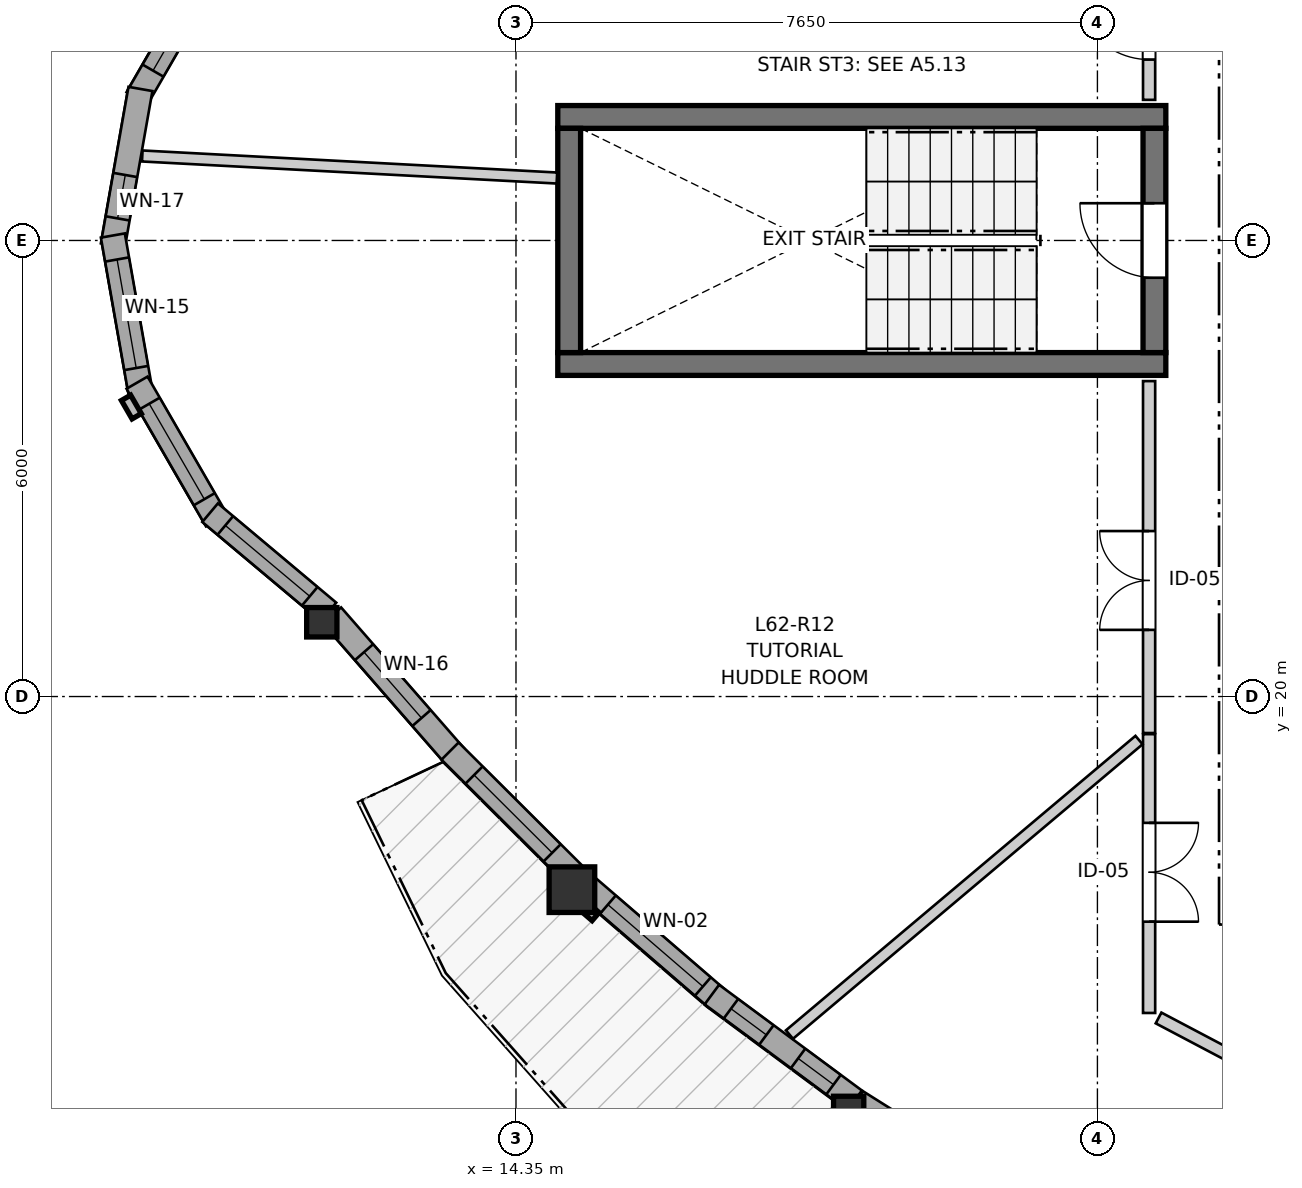
"""IFC4 building model, lengths in metres.
Left out: names, types, materials, properties, quantities, classifications, styles, units other than length and angle.
Written with IfcOpenShell. Run it as: python <this file> out.ifc"""

import sys

from ifc_helpers import new_model, si_unit, direction, frame, frame_2d, origin, origin_2d, place, context, subcontext, project, spatial, rectangle, i_section, extrude, source, transform, mapped, element, fill, save


model = new_model("IFC4")
c1 = context("Model", 3, precision=1e-05, world=origin(), true_north=direction((0.0, 1.0)))
c2 = subcontext(c1, "Body", "Model", "MODEL_VIEW")
j1 = project(units=[si_unit("LENGTHUNIT", "METRE"), si_unit("PLANEANGLEUNIT", "RADIAN")], contexts=[c1])
p1 = place(None, origin())
s1 = spatial("IfcSite", under=j1, at=p1, CompositionType="ELEMENT")
p2 = place(p1, origin())
s2 = spatial("IfcBuilding", under=s1, at=p2, CompositionType="ELEMENT")
p3 = place(p2, frame((0.0, 0.0, 208.4)))
s3 = spatial("IfcBuildingStorey", under=s2, at=p3, CompositionType="ELEMENT", Elevation=208.4)
for number, where, z_axis, x_axis in (
    (1, (14.9, 24.375, 0.0), (0.0, 0.0, 1.0), (1.0, 0.0, 0.0)),
    (2, (22.9, 27.625, 0.0), (0.0, 0.0, 1.0), (-1.0, 0.0, 0.0)),
):
    element("IfcWall", number, at=place(p3, frame(where, z_axis=z_axis, x_axis=x_axis)), inside=s3, PredefinedType="SHEAR", context=c2, shape_type="SweptSolid", body=[
        extrude(rectangle(XDim=8.0, YDim=0.3, at=frame_2d((4.0, 0.0))), origin(), (0.0, 0.0, 1.0), 2.935),
    ])
p4 = place(p3, frame((15.05, 27.475, 0.0), z_axis=(0.0, 0.0, 1.0), x_axis=(0.0, -1.0, 0.0)))
e3 = element("IfcWall", 3, at=p4, inside=s3, PredefinedType="SHEAR", context=c2, shape_type="SweptSolid", body=[
    extrude(rectangle(XDim=2.95, YDim=0.3, at=frame_2d((1.475, 0.0))), origin(), (0.0, 0.0, 1.0), 2.935),
])
p5 = place(p3, frame((22.75, 24.525, 0.0), z_axis=(0.0, 0.0, 1.0), x_axis=(0.0, 1.0, 0.0)))
e4 = element("IfcWall", 4, at=p5, inside=s3, PredefinedType="SHEAR", context=c2, shape_type="SweptSolid", body=[
    extrude(rectangle(XDim=2.95, YDim=0.3, at=frame_2d((1.475, 0.0))), origin(), (0.0, 0.0, 1.0), 2.935),
])
p6 = place(p5, frame((0.985, 0.0, 0.0)))
e5 = element("IfcOpeningElement", 5, at=p6, cuts=e4, PredefinedType="OPENING", context=c2, shape_type="SweptSolid", body=[
    extrude(rectangle(XDim=0.98, YDim=2.15, at=frame_2d((0.49, 1.075))), frame((0.0, 0.16, 0.0), z_axis=(0.0, -1.0, 0.0), x_axis=(1.0, 0.0, 0.0)), (0.0, 0.0, 1.0), 0.32),
])
m1 = source(origin(), c2, "Body", "SweptSolid", [
    extrude(i_section(OverallWidth=0.398, OverallDepth=0.387, WebThickness=0.019, FlangeThickness=0.03, FilletRadius=0.015, at=origin_2d()), origin(), (0.0, 0.0, 1.0), 2.935),
])
p7 = place(p3, frame((11.795, 20.977, 0.0), z_axis=(0.0, 0.0, 1.0), x_axis=(1.0, 0.0, 0.0)))
e6 = element("IfcColumn", 6, at=p7, inside=s3, PredefinedType="PILASTER", context=c2, shape_type="MappedRepresentation", body=[
    mapped(m1, transform((0.0, 0.0, 0.0), x_axis=(1.0, 0.0, 0.0), y_axis=(0.0, 1.0, 0.0), z_axis=(0.0, 0.0, 1.0), scale=1.0)),
])
m2 = source(origin(), c2, "Body", "SweptSolid", [
    extrude(rectangle(XDim=0.6, YDim=0.6, at=origin_2d()), origin(), (0.0, 0.0, 1.0), 2.935),
])
p8 = place(p3, frame((15.086, 17.459, 0.0), z_axis=(0.0, 0.0, 1.0), x_axis=(1.0, 0.0, 0.0)))
e7 = element("IfcColumn", 7, at=p8, inside=s3, PredefinedType="COLUMN", context=c2, shape_type="MappedRepresentation", body=[
    mapped(m2, transform((0.0, 0.0, 0.0), x_axis=(1.0, 0.0, 0.0), y_axis=(0.0, 1.0, 0.0), z_axis=(0.0, 0.0, 1.0), scale=1.0)),
])
p9 = place(p3, frame((18.727, 14.548, 0.0), z_axis=(0.0, 0.0, 1.0), x_axis=(1.0, 0.0, 0.0)))
e8 = element("IfcColumn", 8, at=p9, inside=s3, PredefinedType="PILASTER", context=c2, shape_type="MappedRepresentation", body=[
    mapped(m1, transform((0.0, 0.0, 0.0), x_axis=(1.0, 0.0, 0.0), y_axis=(0.0, 1.0, 0.0), z_axis=(0.0, 0.0, 1.0), scale=1.0)),
])
p10 = place(p3, frame((10.409, 29.681, 0.0), z_axis=(0.0, 0.0, 1.0), x_axis=(-0.49990781971, -0.866078617559, 0.0)))
e9 = element("IfcWall", 9, at=p10, inside=s3, PredefinedType="SOLIDWALL", context=c2, shape_type="SweptSolid", body=[
    extrude(rectangle(XDim=2.09, YDim=0.32, at=frame_2d((1.045, 0.0))), origin(), (0.0, 0.0, 1.0), 2.555),
])
p11 = place(p10, frame((0.42, 0.0, 0.82)))
e10 = element("IfcOpeningElement", 10, at=p11, cuts=e9, PredefinedType="OPENING", context=c2, shape_type="SweptSolid", body=[
    extrude(rectangle(XDim=1.25, YDim=1.35, at=frame_2d((0.625, 0.675))), frame((0.0, 0.17, 0.0), z_axis=(0.0, -1.0, 0.0), x_axis=(1.0, 0.0, 0.0)), (0.0, 0.0, 1.0), 0.34),
])
p12 = place(p3, frame((9.409, 27.993, 0.0), z_axis=(0.0, 0.0, 1.0), x_axis=(-0.173672066494, -0.984803540469, 0.0)))
e11 = element("IfcWall", 11, at=p12, inside=s3, PredefinedType="SOLIDWALL", context=c2, shape_type="SweptSolid", body=[
    extrude(rectangle(XDim=2.09, YDim=0.32, at=frame_2d((1.045, 0.0))), origin(), (0.0, 0.0, 1.0), 2.555),
])
p13 = place(p12, frame((1.149, 0.0, 0.82)))
e12 = element("IfcOpeningElement", 12, at=p13, cuts=e11, PredefinedType="OPENING", context=c2, shape_type="SweptSolid", body=[
    extrude(rectangle(XDim=0.58, YDim=1.35, at=frame_2d((0.29, 0.675))), frame((0.0, 0.17, 0.0), z_axis=(0.0, -1.0, 0.0), x_axis=(1.0, 0.0, 0.0)), (0.0, 0.0, 1.0), 0.34),
])
p14 = place(p3, frame((9.046, 26.065, 0.0), z_axis=(0.0, 0.0, 1.0), x_axis=(0.173672066494, -0.984803540469, 0.0)))
e13 = element("IfcWall", 13, at=p14, inside=s3, PredefinedType="SOLIDWALL", context=c2, shape_type="SweptSolid", body=[
    extrude(rectangle(XDim=2.09, YDim=0.32, at=frame_2d((1.045, 0.0))), origin(), (0.0, 0.0, 1.0), 2.555),
])
p15 = place(p14, frame((0.32, 0.0, 0.82)))
e14 = element("IfcOpeningElement", 14, at=p15, cuts=e13, PredefinedType="OPENING", context=c2, shape_type="SweptSolid", body=[
    extrude(rectangle(XDim=1.45, YDim=1.25, at=frame_2d((0.725, 0.625))), frame((0.0, 0.17, 0.0), z_axis=(0.0, -1.0, 0.0), x_axis=(1.0, 0.0, 0.0)), (0.0, 0.0, 1.0), 0.34),
])
p16 = place(p3, frame((9.365, 24.129, 0.0), z_axis=(0.0, 0.0, 1.0), x_axis=(0.49990781971, -0.866078617559, 0.0)))
e15 = element("IfcWall", 15, at=p16, inside=s3, PredefinedType="SOLIDWALL", context=c2, shape_type="SweptSolid", body=[
    extrude(rectangle(XDim=2.09, YDim=0.32, at=frame_2d((1.045, 0.0))), origin(), (0.0, 0.0, 1.0), 2.555),
])
p17 = place(p16, frame((0.32, 0.0, 0.82)))
e16 = element("IfcOpeningElement", 16, at=p17, cuts=e15, PredefinedType="OPENING", context=c2, shape_type="SweptSolid", body=[
    extrude(rectangle(XDim=1.45, YDim=1.25, at=frame_2d((0.725, 0.625))), frame((0.0, 0.17, 0.0), z_axis=(0.0, -1.0, 0.0), x_axis=(1.0, 0.0, 0.0)), (0.0, 0.0, 1.0), 0.34),
])
p18 = place(p3, frame((10.326, 22.419, 0.0), z_axis=(0.0, 0.0, 1.0), x_axis=(0.766099948115, -0.642721455608, 0.0)))
e17 = element("IfcWall", 17, at=p18, inside=s3, PredefinedType="SOLIDWALL", context=c2, shape_type="SweptSolid", body=[
    extrude(rectangle(XDim=2.032, YDim=0.32, at=frame_2d((1.016, 0.0))), origin(), (0.0, 0.0, 1.0), 2.555),
])
p19 = place(p18, frame((0.261, 0.0, 0.82)))
e18 = element("IfcOpeningElement", 18, at=p19, cuts=e17, PredefinedType="OPENING", context=c2, shape_type="SweptSolid", body=[
    extrude(rectangle(XDim=1.45, YDim=1.25, at=frame_2d((0.725, 0.625))), frame((0.0, 0.17, 0.0), z_axis=(0.0, -1.0, 0.0), x_axis=(1.0, 0.0, 0.0)), (0.0, 0.0, 1.0), 0.34),
])
p20 = place(p3, frame((11.929, 21.067, 0.0), z_axis=(0.0, 0.0, 1.0), x_axis=(0.657623588515, -0.753346677054, 0.0)))
e19 = element("IfcWall", 19, at=p20, inside=s3, PredefinedType="SOLIDWALL", context=c2, shape_type="SweptSolid", body=[
    extrude(rectangle(XDim=2.454, YDim=0.32, at=frame_2d((1.227, 0.0))), origin(), (0.0, 0.0, 1.0), 2.555),
])
p21 = place(p20, frame((0.642, 0.0, 0.82)))
e20 = element("IfcOpeningElement", 20, at=p21, cuts=e19, PredefinedType="OPENING", context=c2, shape_type="SweptSolid", body=[
    extrude(rectangle(XDim=1.15, YDim=1.2, at=frame_2d((0.575, 0.6))), frame((0.0, 0.17, 0.0), z_axis=(0.0, -1.0, 0.0), x_axis=(1.0, 0.0, 0.0)), (0.0, 0.0, 1.0), 0.34),
])
p22 = place(p3, frame((13.483, 19.282, 0.0), z_axis=(0.0, 0.0, 1.0), x_axis=(0.7083616261, -0.70584970544, 0.0)))
e21 = element("IfcWall", 21, at=p22, inside=s3, PredefinedType="SOLIDWALL", context=c2, shape_type="SweptSolid", body=[
    extrude(rectangle(XDim=2.333, YDim=0.32, at=frame_2d((1.166, 0.0))), origin(), (0.0, 0.0, 1.0), 2.555),
])
p23 = place(p22, frame((0.446, 0.0, 0.82)))
e22 = element("IfcOpeningElement", 22, at=p23, cuts=e21, PredefinedType="OPENING", context=c2, shape_type="SweptSolid", body=[
    extrude(rectangle(XDim=1.45, YDim=1.25, at=frame_2d((0.725, 0.625))), frame((0.0, 0.17, 0.0), z_axis=(0.0, -1.0, 0.0), x_axis=(1.0, 0.0, 0.0)), (0.0, 0.0, 1.0), 0.34),
])
p24 = place(p3, frame((15.259, 17.521, 0.0), z_axis=(0.0, 0.0, 1.0), x_axis=(0.757533377792, -0.652796431923, 0.0)))
e23 = element("IfcWall", 23, at=p24, inside=s3, PredefinedType="SOLIDWALL", context=c2, shape_type="SweptSolid", body=[
    extrude(rectangle(XDim=2.294, YDim=0.32, at=frame_2d((1.147, 0.0))), origin(), (0.0, 0.0, 1.0), 2.555),
])
p25 = place(p24, frame((0.397, 0.0, 0.82)))
e24 = element("IfcOpeningElement", 24, at=p25, cuts=e23, PredefinedType="OPENING", context=c2, shape_type="SweptSolid", body=[
    extrude(rectangle(XDim=1.65, YDim=1.45, at=frame_2d((0.825, 0.725))), frame((0.0, 0.17, 0.0), z_axis=(0.0, -1.0, 0.0), x_axis=(1.0, 0.0, 0.0)), (0.0, 0.0, 1.0), 0.34),
])
p26 = place(p3, frame((16.927, 16.079, 0.0), z_axis=(0.0, 0.0, 1.0), x_axis=(0.803843896942, -0.594840305754, 0.0)))
e25 = element("IfcWall", 25, at=p26, inside=s3, PredefinedType="SOLIDWALL", context=c2, shape_type="SweptSolid", body=[
    extrude(rectangle(XDim=2.337, YDim=0.32, at=frame_2d((1.169, 0.0))), origin(), (0.0, 0.0, 1.0), 2.555),
])
p27 = place(p26, frame((0.312, 0.0, 0.82)))
e26 = element("IfcOpeningElement", 26, at=p27, cuts=e25, PredefinedType="OPENING", context=c2, shape_type="SweptSolid", body=[
    extrude(rectangle(XDim=0.58, YDim=1.35, at=frame_2d((0.29, 0.675))), frame((0.0, 0.17, 0.0), z_axis=(0.0, -1.0, 0.0), x_axis=(1.0, 0.0, 0.0)), (0.0, 0.0, 1.0), 0.34),
])
p28 = place(p26, frame((1.411, 0.0, 0.82)))
e27 = element("IfcOpeningElement", 27, at=p28, cuts=e25, PredefinedType="OPENING", context=c2, shape_type="SweptSolid", body=[
    extrude(rectangle(XDim=0.58, YDim=1.35, at=frame_2d((0.29, 0.675))), frame((0.0, 0.17, 0.0), z_axis=(0.0, -1.0, 0.0), x_axis=(1.0, 0.0, 0.0)), (0.0, 0.0, 1.0), 0.34),
])
p29 = place(p3, frame((18.829, 14.673, 0.0), z_axis=(0.0, 0.0, 1.0), x_axis=(0.846418748285, -0.53251788942, 0.0)))
e28 = element("IfcWall", 28, at=p29, inside=s3, PredefinedType="SOLIDWALL", context=c2, shape_type="SweptSolid", body=[
    extrude(rectangle(XDim=2.324, YDim=0.32, at=frame_2d((1.162, 0.0))), origin(), (0.0, 0.0, 1.0), 2.555),
])
p30 = place(p29, frame((0.477, 0.0, 0.82)))
e29 = element("IfcOpeningElement", 29, at=p30, cuts=e28, PredefinedType="OPENING", context=c2, shape_type="SweptSolid", body=[
    extrude(rectangle(XDim=1.35, YDim=1.45, at=frame_2d((0.675, 0.725))), frame((0.0, 0.17, 0.0), z_axis=(0.0, -1.0, 0.0), x_axis=(1.0, 0.0, 0.0)), (0.0, 0.0, 1.0), 0.34),
])
p31 = place(p3, frame((22.68, 19.52, 0.0), z_axis=(0.0, 0.0, 1.0), x_axis=(0.0, 1.0, 0.0)))
e30 = element("IfcWall", 30, at=p31, inside=s3, PredefinedType="PARTITIONING", context=c2, shape_type="SweptSolid", body=[
    extrude(rectangle(XDim=4.63, YDim=0.16, at=frame_2d((2.315, 0.0))), origin(), (0.0, 0.0, 1.0), 2.935),
])
p32 = place(p31, frame((1.357, 0.0, 0.0)))
e31 = element("IfcOpeningElement", 31, at=p32, cuts=e30, PredefinedType="OPENING", context=c2, shape_type="SweptSolid", body=[
    extrude(rectangle(XDim=1.3, YDim=2.1, at=frame_2d((0.65, 1.05))), frame((0.0, 0.09, 0.0), z_axis=(0.0, -1.0, 0.0), x_axis=(1.0, 0.0, 0.0)), (0.0, 0.0, 1.0), 0.18),
])
p33 = place(p3, frame((22.68, 19.505, 0.0), z_axis=(0.0, 0.0, 1.0), x_axis=(0.0, -1.0, 0.0)))
e32 = element("IfcWall", 32, at=p33, inside=s3, PredefinedType="PARTITIONING", context=c2, shape_type="SweptSolid", body=[
    extrude(rectangle(XDim=3.668, YDim=0.16, at=frame_2d((1.834, 0.0))), origin(), (0.0, 0.0, 1.0), 2.935),
])
p34 = place(p33, frame((1.167, 0.0, 0.0)))
e33 = element("IfcOpeningElement", 33, at=p34, cuts=e32, PredefinedType="OPENING", context=c2, shape_type="SweptSolid", body=[
    extrude(rectangle(XDim=1.3, YDim=2.1, at=frame_2d((0.65, 1.05))), frame((0.0, 0.09, 0.0), z_axis=(0.0, -1.0, 0.0), x_axis=(1.0, 0.0, 0.0)), (0.0, 0.0, 1.0), 0.18),
])
p35 = place(p3, frame((22.68, 27.85, 0.0), z_axis=(0.0, 0.0, 1.0), x_axis=(0.0, 1.0, 0.0)))
e34 = element("IfcWall", 34, at=p35, inside=s3, PredefinedType="PARTITIONING", context=c2, shape_type="SweptSolid", body=[
    extrude(rectangle(XDim=1.929, YDim=0.16, at=frame_2d((0.964, 0.0))), origin(), (0.0, 0.0, 1.0), 2.935),
])
p36 = place(p35, frame((0.53, 0.0, 0.0)))
e35 = element("IfcOpeningElement", 35, at=p36, cuts=e34, PredefinedType="OPENING", context=c2, shape_type="SweptSolid", body=[
    extrude(rectangle(XDim=0.96, YDim=2.1, at=frame_2d((0.48, 1.05))), frame((0.0, 0.09, 0.0), z_axis=(0.0, -1.0, 0.0), x_axis=(1.0, 0.0, 0.0)), (0.0, 0.0, 1.0), 0.18),
])
p37 = place(p3, frame((17.948, 15.553, 0.0), z_axis=(0.0, 0.0, 1.0), x_axis=(0.764805901006, 0.644260765364, 0.0)))
e36 = element("IfcWall", 36, at=p37, inside=s3, PredefinedType="PARTITIONING", context=c2, shape_type="SweptSolid", body=[
    extrude(rectangle(XDim=6.013, YDim=0.145, at=frame_2d((3.007, 0.0))), origin(), (0.0, 0.0, 1.0), 2.935),
])
p38 = place(p3, frame((9.433, 27.112, 0.0), z_axis=(0.0, 0.0, 1.0), x_axis=(0.998589537807, -0.053093643525, 0.0)))
e37 = element("IfcWall", 37, at=p38, inside=s3, PredefinedType="PARTITIONING", context=c2, shape_type="SweptSolid", body=[
    extrude(rectangle(XDim=5.463, YDim=0.145, at=frame_2d((2.731, 0.0))), origin(), (0.0, 0.0, 1.0), 2.935),
])
p39 = place(p3, frame((22.804, 15.771, 0.0), z_axis=(0.0, 0.0, 1.0), x_axis=(0.884421402819, -0.4666891709, 0.0)))
e38 = element("IfcWall", 38, at=p39, inside=s3, PredefinedType="PARTITIONING", context=c2, shape_type="SweptSolid", body=[
    extrude(rectangle(XDim=1.451, YDim=0.16, at=frame_2d((0.726, 0.0))), origin(), (0.0, 0.0, 1.0), 2.935),
])
m3 = source(origin(), c2, "Body", "SweptSolid", [
    extrude(rectangle(XDim=1.25, YDim=1.35, at=frame_2d((0.625, 0.675))), frame((0.0, 0.03, 0.0), z_axis=(0.0, -1.0, 0.0), x_axis=(1.0, 0.0, 0.0)), (0.0, 0.0, 1.0), 0.06),
])
p40 = place(p11, origin())
e39 = element("IfcWindow", 39, at=p40, inside=s3, PartitioningType="SINGLE_PANEL", PredefinedType="WINDOW", context=c2, shape_type="MappedRepresentation", body=[
    mapped(m3, transform((0.0, 0.0, 0.0), x_axis=(1.0, 0.0, 0.0), y_axis=(0.0, 1.0, 0.0), z_axis=(0.0, 0.0, 1.0), scale=1.0)),
])
fill(e10, e39)
m4 = source(origin(), c2, "Body", "SweptSolid", [
    extrude(rectangle(XDim=0.58, YDim=1.35, at=frame_2d((0.29, 0.675))), frame((0.0, 0.03, 0.0), z_axis=(0.0, -1.0, 0.0), x_axis=(1.0, 0.0, 0.0)), (0.0, 0.0, 1.0), 0.06),
])
p41 = place(p13, origin())
e40 = element("IfcWindow", 40, at=p41, inside=s3, PartitioningType="SINGLE_PANEL", PredefinedType="WINDOW", context=c2, shape_type="MappedRepresentation", body=[
    mapped(m4, transform((0.0, 0.0, 0.0), x_axis=(1.0, 0.0, 0.0), y_axis=(0.0, 1.0, 0.0), z_axis=(0.0, 0.0, 1.0), scale=1.0)),
])
fill(e12, e40)
m5 = source(origin(), c2, "Body", "SweptSolid", [
    extrude(rectangle(XDim=1.45, YDim=1.25, at=frame_2d((0.725, 0.625))), frame((0.0, 0.03, 0.0), z_axis=(0.0, -1.0, 0.0), x_axis=(1.0, 0.0, 0.0)), (0.0, 0.0, 1.0), 0.06),
])
p42 = place(p15, origin())
e41 = element("IfcWindow", 41, at=p42, inside=s3, PartitioningType="SINGLE_PANEL", PredefinedType="WINDOW", context=c2, shape_type="MappedRepresentation", body=[
    mapped(m5, transform((0.0, 0.0, 0.0), x_axis=(1.0, 0.0, 0.0), y_axis=(0.0, 1.0, 0.0), z_axis=(0.0, 0.0, 1.0), scale=1.0)),
])
fill(e14, e41)
p43 = place(p17, origin())
e42 = element("IfcWindow", 42, at=p43, inside=s3, PartitioningType="SINGLE_PANEL", PredefinedType="WINDOW", context=c2, shape_type="MappedRepresentation", body=[
    mapped(m5, transform((0.0, 0.0, 0.0), x_axis=(1.0, 0.0, 0.0), y_axis=(0.0, 1.0, 0.0), z_axis=(0.0, 0.0, 1.0), scale=1.0)),
])
fill(e16, e42)
p44 = place(p19, origin())
e43 = element("IfcWindow", 43, at=p44, inside=s3, PartitioningType="SINGLE_PANEL", PredefinedType="WINDOW", context=c2, shape_type="MappedRepresentation", body=[
    mapped(m5, transform((0.0, 0.0, 0.0), x_axis=(1.0, 0.0, 0.0), y_axis=(0.0, 1.0, 0.0), z_axis=(0.0, 0.0, 1.0), scale=1.0)),
])
fill(e18, e43)
m6 = source(origin(), c2, "Body", "SweptSolid", [
    extrude(rectangle(XDim=1.15, YDim=1.2, at=frame_2d((0.575, 0.6))), frame((0.0, 0.03, 0.0), z_axis=(0.0, -1.0, 0.0), x_axis=(1.0, 0.0, 0.0)), (0.0, 0.0, 1.0), 0.06),
])
p45 = place(p21, origin())
e44 = element("IfcWindow", 44, at=p45, inside=s3, PartitioningType="SINGLE_PANEL", PredefinedType="WINDOW", context=c2, shape_type="MappedRepresentation", body=[
    mapped(m6, transform((0.0, 0.0, 0.0), x_axis=(1.0, 0.0, 0.0), y_axis=(0.0, 1.0, 0.0), z_axis=(0.0, 0.0, 1.0), scale=1.0)),
])
fill(e20, e44)
p46 = place(p23, origin())
e45 = element("IfcWindow", 45, at=p46, inside=s3, PartitioningType="SINGLE_PANEL", PredefinedType="WINDOW", context=c2, shape_type="MappedRepresentation", body=[
    mapped(m5, transform((0.0, 0.0, 0.0), x_axis=(1.0, 0.0, 0.0), y_axis=(0.0, 1.0, 0.0), z_axis=(0.0, 0.0, 1.0), scale=1.0)),
])
fill(e22, e45)
m7 = source(origin(), c2, "Body", "SweptSolid", [
    extrude(rectangle(XDim=1.65, YDim=1.45, at=frame_2d((0.825, 0.725))), frame((0.0, 0.03, 0.0), z_axis=(0.0, -1.0, 0.0), x_axis=(1.0, 0.0, 0.0)), (0.0, 0.0, 1.0), 0.06),
])
p47 = place(p25, origin())
e46 = element("IfcWindow", 46, at=p47, inside=s3, PartitioningType="SINGLE_PANEL", PredefinedType="WINDOW", context=c2, shape_type="MappedRepresentation", body=[
    mapped(m7, transform((0.0, 0.0, 0.0), x_axis=(1.0, 0.0, 0.0), y_axis=(0.0, 1.0, 0.0), z_axis=(0.0, 0.0, 1.0), scale=1.0)),
])
fill(e24, e46)
p48 = place(p27, origin())
e47 = element("IfcWindow", 47, at=p48, inside=s3, PartitioningType="SINGLE_PANEL", PredefinedType="WINDOW", context=c2, shape_type="MappedRepresentation", body=[
    mapped(m4, transform((0.0, 0.0, 0.0), x_axis=(1.0, 0.0, 0.0), y_axis=(0.0, 1.0, 0.0), z_axis=(0.0, 0.0, 1.0), scale=1.0)),
])
fill(e26, e47)
p49 = place(p28, origin())
e48 = element("IfcWindow", 48, at=p49, inside=s3, PartitioningType="SINGLE_PANEL", PredefinedType="WINDOW", context=c2, shape_type="MappedRepresentation", body=[
    mapped(m4, transform((0.0, 0.0, 0.0), x_axis=(1.0, 0.0, 0.0), y_axis=(0.0, 1.0, 0.0), z_axis=(0.0, 0.0, 1.0), scale=1.0)),
])
fill(e27, e48)
m8 = source(origin(), c2, "Body", "SweptSolid", [
    extrude(rectangle(XDim=0.98, YDim=2.15, at=frame_2d((0.49, 1.075))), frame((0.0, 0.025, 0.0), z_axis=(0.0, -1.0, 0.0), x_axis=(1.0, 0.0, 0.0)), (0.0, 0.0, 1.0), 0.05),
])
p50 = place(p6, origin())
e49 = element("IfcDoor", 49, at=p50, inside=s3, OperationType="SINGLE_SWING_RIGHT", PredefinedType="DOOR", context=c2, shape_type="MappedRepresentation", body=[
    mapped(m8, transform((0.0, 0.0, 0.0), x_axis=(1.0, 0.0, 0.0), y_axis=(0.0, 1.0, 0.0), z_axis=(0.0, 0.0, 1.0), scale=1.0)),
])
fill(e5, e49)
m9 = source(origin(), c2, "Body", "SweptSolid", [
    extrude(rectangle(XDim=1.3, YDim=2.1, at=frame_2d((0.65, 1.05))), frame((0.0, 0.025, 0.0), z_axis=(0.0, -1.0, 0.0), x_axis=(1.0, 0.0, 0.0)), (0.0, 0.0, 1.0), 0.05),
])
p51 = place(p32, origin())
e50 = element("IfcDoor", 50, at=p51, inside=s3, OperationType="DOUBLE_DOOR_SINGLE_SWING", PredefinedType="DOOR", context=c2, shape_type="MappedRepresentation", body=[
    mapped(m9, transform((0.0, 0.0, 0.0), x_axis=(1.0, 0.0, 0.0), y_axis=(0.0, 1.0, 0.0), z_axis=(0.0, 0.0, 1.0), scale=1.0)),
])
fill(e31, e50)
p52 = place(p34, origin())
e51 = element("IfcDoor", 51, at=p52, inside=s3, OperationType="DOUBLE_DOOR_SINGLE_SWING", PredefinedType="DOOR", context=c2, shape_type="MappedRepresentation", body=[
    mapped(m9, transform((0.0, 0.0, 0.0), x_axis=(1.0, 0.0, 0.0), y_axis=(0.0, 1.0, 0.0), z_axis=(0.0, 0.0, 1.0), scale=1.0)),
])
fill(e33, e51)
m10 = source(origin(), c2, "Body", "SweptSolid", [
    extrude(rectangle(XDim=0.96, YDim=2.1, at=frame_2d((0.48, 1.05))), frame((0.0, 0.025, 0.0), z_axis=(0.0, -1.0, 0.0), x_axis=(1.0, 0.0, 0.0)), (0.0, 0.0, 1.0), 0.05),
])
p53 = place(p36, origin())
e52 = element("IfcDoor", 52, at=p53, inside=s3, OperationType="SINGLE_SWING_RIGHT", PredefinedType="DOOR", context=c2, shape_type="MappedRepresentation", body=[
    mapped(m10, transform((0.0, 0.0, 0.0), x_axis=(1.0, 0.0, 0.0), y_axis=(0.0, 1.0, 0.0), z_axis=(0.0, 0.0, 1.0), scale=1.0)),
])
fill(e35, e52)
save(model, sys.argv[1])
